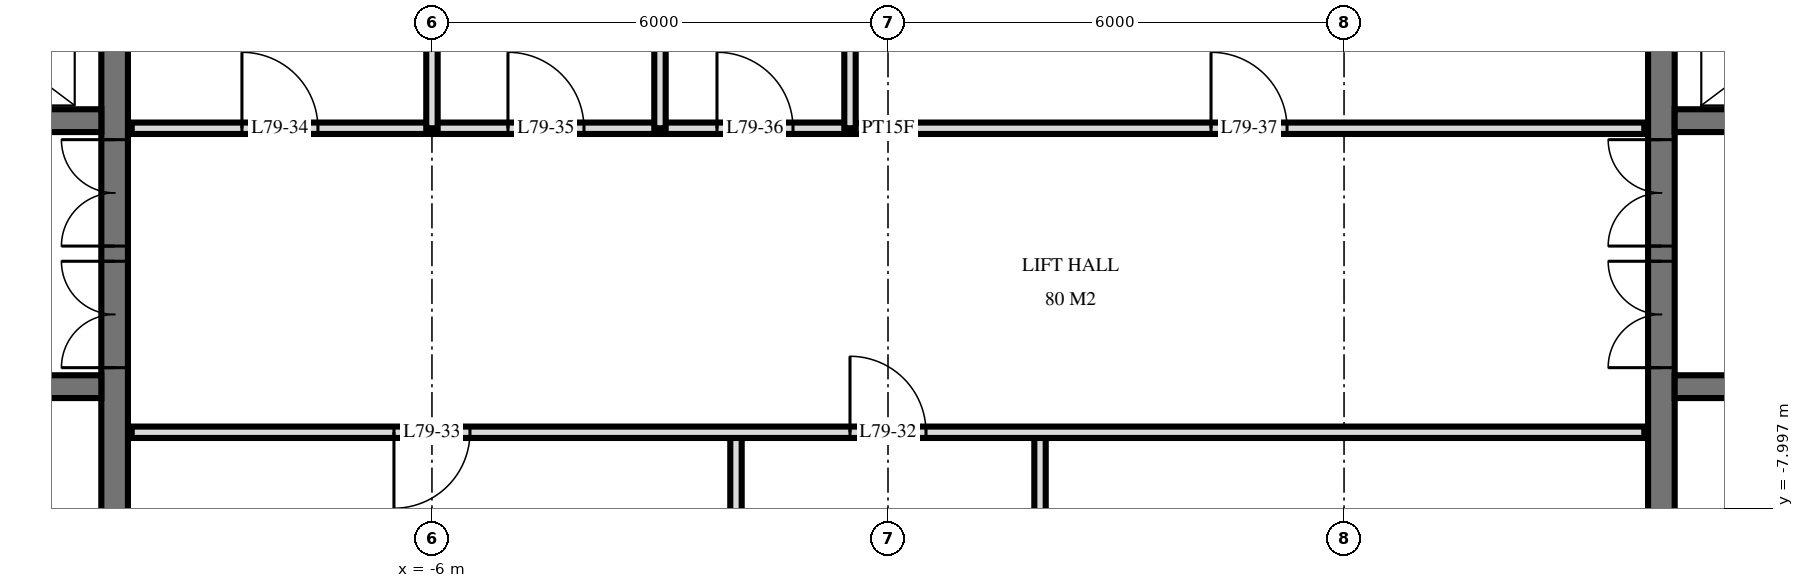
"""IFC4 building model, lengths in metres.
Left out: names, types, materials, properties, quantities, classifications, styles, units other than length and angle.
Written with IfcOpenShell. Run it as: python <this file> out.ifc"""

import sys

from ifc_helpers import new_model, si_unit, direction, frame, frame_2d, origin, place, context, subcontext, project, spatial, rectangle, extrude, element, fill, save


model = new_model("IFC4")
c1 = context("Model", 3, precision=1e-05, world=origin(), true_north=direction((0.0, 1.0)))
c2 = subcontext(c1, "Body", "Model", "MODEL_VIEW")
j1 = project(units=[si_unit("LENGTHUNIT", "METRE"), si_unit("PLANEANGLEUNIT", "RADIAN")], contexts=[c1])
p1 = place(None, origin())
s1 = spatial("IfcSite", under=j1, at=p1, CompositionType="ELEMENT")
p2 = place(p1, origin())
s2 = spatial("IfcBuilding", under=s1, at=p2, CompositionType="ELEMENT")
p3 = place(p2, frame((0.0, 0.0, 298.1)))
s3 = spatial("IfcBuildingStorey", under=s2, at=p3, CompositionType="ELEMENT", Elevation=298.1)
p4 = place(p3, frame((-10.175, -14.55, 0.0), z_axis=(0.0, 0.0, 1.0), x_axis=(0.0, 1.0, 0.0)))
e1 = element("IfcWall", 1, at=p4, inside=s3, PredefinedType="SHEAR", context=c2, shape_type="SweptSolid", body=[
    extrude(rectangle(XDim=14.1, YDim=0.35, at=frame_2d((7.05, 0.0))), origin(), (0.0, 0.0, 1.0), 3.5),
])
p5 = place(p4, frame((8.4, 0.0, 0.0)))
e2 = element("IfcOpeningElement", 2, at=p5, cuts=e1, PredefinedType="OPENING", context=c2, shape_type="SweptSolid", body=[
    extrude(rectangle(XDim=1.4, YDim=2.4, at=frame_2d((0.7, 1.2))), frame((0.0, 0.185, 0.0), z_axis=(0.0, -1.0, 0.0), x_axis=(1.0, 0.0, 0.0)), (0.0, 0.0, 1.0), 0.37),
])
p6 = place(p4, frame((10.0, 0.0, 0.0)))
e3 = element("IfcOpeningElement", 3, at=p6, cuts=e1, PredefinedType="OPENING", context=c2, shape_type="SweptSolid", body=[
    extrude(rectangle(XDim=1.4, YDim=2.4, at=frame_2d((0.7, 1.2))), frame((0.0, 0.185, 0.0), z_axis=(0.0, -1.0, 0.0), x_axis=(1.0, 0.0, 0.0)), (0.0, 0.0, 1.0), 0.37),
])
p7 = place(p4, frame((4.0, 0.0, 0.0)))
e4 = element("IfcOpeningElement", 4, at=p7, cuts=e1, PredefinedType="OPENING", context=c2, shape_type="SweptSolid", body=[
    extrude(rectangle(XDim=1.2, YDim=2.1, at=frame_2d((0.6, 1.05))), frame((0.0, 0.185, 0.0), z_axis=(0.0, -1.0, 0.0), x_axis=(1.0, 0.0, 0.0)), (0.0, 0.0, 1.0), 0.37),
])
p8 = place(p3, frame((-19.05, -2.9, 0.0), z_axis=(0.0, 0.0, 1.0), x_axis=(1.0, 0.0, 0.0)))
e5 = element("IfcWall", 5, at=p8, inside=s3, PredefinedType="SHEAR", context=c2, shape_type="SweptSolid", body=[
    extrude(rectangle(XDim=8.7, YDim=0.3, at=frame_2d((4.35, 0.0))), origin(), (0.0, 0.0, 1.0), 3.5),
])
p9 = place(p8, frame((6.8, 0.0, 0.0)))
e6 = element("IfcOpeningElement", 6, at=p9, cuts=e5, PredefinedType="OPENING", context=c2, shape_type="SweptSolid", body=[
    extrude(rectangle(XDim=1.1, YDim=2.1, at=frame_2d((0.55, 1.05))), frame((0.0, 0.16, 0.0), z_axis=(0.0, -1.0, 0.0), x_axis=(1.0, 0.0, 0.0)), (0.0, 0.0, 1.0), 0.32),
])
p10 = place(p8, frame((3.8, 0.0, 0.0)))
e7 = element("IfcOpeningElement", 7, at=p10, cuts=e5, PredefinedType="OPENING", context=c2, shape_type="SweptSolid", body=[
    extrude(rectangle(XDim=1.1, YDim=2.1, at=frame_2d((0.55, 1.05))), frame((0.0, 0.16, 0.0), z_axis=(0.0, -1.0, 0.0), x_axis=(1.0, 0.0, 0.0)), (0.0, 0.0, 1.0), 0.32),
])
p11 = place(p8, frame((1.863, 0.0, 0.0)))
e8 = element("IfcOpeningElement", 8, at=p11, cuts=e5, PredefinedType="OPENING", context=c2, shape_type="SweptSolid", body=[
    extrude(rectangle(XDim=0.9, YDim=2.1, at=frame_2d((0.45, 1.05))), frame((0.0, 0.16, 0.0), z_axis=(0.0, -1.0, 0.0), x_axis=(1.0, 0.0, 0.0)), (0.0, 0.0, 1.0), 0.32),
])
p12 = place(p8, frame((0.438, 0.0, 0.0)))
e9 = element("IfcOpeningElement", 9, at=p12, cuts=e5, PredefinedType="OPENING", context=c2, shape_type="SweptSolid", body=[
    extrude(rectangle(XDim=0.9, YDim=2.1, at=frame_2d((0.45, 1.05))), frame((0.0, 0.16, 0.0), z_axis=(0.0, -1.0, 0.0), x_axis=(1.0, 0.0, 0.0)), (0.0, 0.0, 1.0), 0.32),
])
p13 = place(p3, frame((-19.05, -6.4, 0.0), z_axis=(0.0, 0.0, 1.0), x_axis=(1.0, 0.0, 0.0)))
e10 = element("IfcWall", 10, at=p13, inside=s3, PredefinedType="SHEAR", context=c2, shape_type="SweptSolid", body=[
    extrude(rectangle(XDim=8.7, YDim=0.3, at=frame_2d((4.35, 0.0))), origin(), (0.0, 0.0, 1.0), 3.5),
])
p14 = place(p13, frame((0.8, 0.0, 0.0)))
e11 = element("IfcOpeningElement", 11, at=p14, cuts=e10, PredefinedType="OPENING", context=c2, shape_type="SweptSolid", body=[
    extrude(rectangle(XDim=1.1, YDim=2.1, at=frame_2d((0.55, 1.05))), frame((0.0, 0.16, 0.0), z_axis=(0.0, -1.0, 0.0), x_axis=(1.0, 0.0, 0.0)), (0.0, 0.0, 1.0), 0.32),
])
p15 = place(p3, frame((10.175, -14.55, 0.0), z_axis=(0.0, 0.0, 1.0), x_axis=(0.0, 1.0, 0.0)))
e12 = element("IfcWall", 12, at=p15, inside=s3, PredefinedType="SHEAR", context=c2, shape_type="SweptSolid", body=[
    extrude(rectangle(XDim=14.1, YDim=0.35, at=frame_2d((7.05, 0.0))), origin(), (0.0, 0.0, 1.0), 3.5),
])
p16 = place(p15, frame((8.4, 0.0, 0.0)))
e13 = element("IfcOpeningElement", 13, at=p16, cuts=e12, PredefinedType="OPENING", context=c2, shape_type="SweptSolid", body=[
    extrude(rectangle(XDim=1.4, YDim=2.4, at=frame_2d((0.7, 1.2))), frame((0.0, 0.185, 0.0), z_axis=(0.0, -1.0, 0.0), x_axis=(1.0, 0.0, 0.0)), (0.0, 0.0, 1.0), 0.37),
])
p17 = place(p15, frame((10.0, 0.0, 0.0)))
e14 = element("IfcOpeningElement", 14, at=p17, cuts=e12, PredefinedType="OPENING", context=c2, shape_type="SweptSolid", body=[
    extrude(rectangle(XDim=1.4, YDim=2.4, at=frame_2d((0.7, 1.2))), frame((0.0, 0.185, 0.0), z_axis=(0.0, -1.0, 0.0), x_axis=(1.0, 0.0, 0.0)), (0.0, 0.0, 1.0), 0.37),
])
p18 = place(p15, frame((4.0, 0.0, 0.0)))
e15 = element("IfcOpeningElement", 15, at=p18, cuts=e12, PredefinedType="OPENING", context=c2, shape_type="SweptSolid", body=[
    extrude(rectangle(XDim=1.2, YDim=2.1, at=frame_2d((0.6, 1.05))), frame((0.0, 0.185, 0.0), z_axis=(0.0, -1.0, 0.0), x_axis=(1.0, 0.0, 0.0)), (0.0, 0.0, 1.0), 0.37),
])
p19 = place(p3, frame((10.35, -2.9, 0.0), z_axis=(0.0, 0.0, 1.0), x_axis=(1.0, 0.0, 0.0)))
e16 = element("IfcWall", 16, at=p19, inside=s3, PredefinedType="SHEAR", context=c2, shape_type="SweptSolid", body=[
    extrude(rectangle(XDim=8.7, YDim=0.3, at=frame_2d((4.35, 0.0))), origin(), (0.0, 0.0, 1.0), 3.5),
])
p20 = place(p19, frame((0.8, 0.0, 0.0)))
e17 = element("IfcOpeningElement", 17, at=p20, cuts=e16, PredefinedType="OPENING", context=c2, shape_type="SweptSolid", body=[
    extrude(rectangle(XDim=1.1, YDim=2.1, at=frame_2d((0.55, 1.05))), frame((0.0, 0.16, 0.0), z_axis=(0.0, -1.0, 0.0), x_axis=(1.0, 0.0, 0.0)), (0.0, 0.0, 1.0), 0.32),
])
p21 = place(p19, frame((3.8, 0.0, 0.0)))
e18 = element("IfcOpeningElement", 18, at=p21, cuts=e16, PredefinedType="OPENING", context=c2, shape_type="SweptSolid", body=[
    extrude(rectangle(XDim=1.1, YDim=2.1, at=frame_2d((0.55, 1.05))), frame((0.0, 0.16, 0.0), z_axis=(0.0, -1.0, 0.0), x_axis=(1.0, 0.0, 0.0)), (0.0, 0.0, 1.0), 0.32),
])
p22 = place(p19, frame((5.938, 0.0, 0.0)))
e19 = element("IfcOpeningElement", 19, at=p22, cuts=e16, PredefinedType="OPENING", context=c2, shape_type="SweptSolid", body=[
    extrude(rectangle(XDim=0.9, YDim=2.1, at=frame_2d((0.45, 1.05))), frame((0.0, 0.16, 0.0), z_axis=(0.0, -1.0, 0.0), x_axis=(1.0, 0.0, 0.0)), (0.0, 0.0, 1.0), 0.32),
])
p23 = place(p19, frame((7.363, 0.0, 0.0)))
e20 = element("IfcOpeningElement", 20, at=p23, cuts=e16, PredefinedType="OPENING", context=c2, shape_type="SweptSolid", body=[
    extrude(rectangle(XDim=0.9, YDim=2.1, at=frame_2d((0.45, 1.05))), frame((0.0, 0.16, 0.0), z_axis=(0.0, -1.0, 0.0), x_axis=(1.0, 0.0, 0.0)), (0.0, 0.0, 1.0), 0.32),
])
p24 = place(p3, frame((10.35, -6.4, 0.0), z_axis=(0.0, 0.0, 1.0), x_axis=(1.0, 0.0, 0.0)))
e21 = element("IfcWall", 21, at=p24, inside=s3, PredefinedType="SHEAR", context=c2, shape_type="SweptSolid", body=[
    extrude(rectangle(XDim=8.7, YDim=0.3, at=frame_2d((4.35, 0.0))), origin(), (0.0, 0.0, 1.0), 3.5),
])
p25 = place(p24, frame((6.8, 0.0, 0.0)))
e22 = element("IfcOpeningElement", 22, at=p25, cuts=e21, PredefinedType="OPENING", context=c2, shape_type="SweptSolid", body=[
    extrude(rectangle(XDim=1.1, YDim=2.1, at=frame_2d((0.55, 1.05))), frame((0.0, 0.16, 0.0), z_axis=(0.0, -1.0, 0.0), x_axis=(1.0, 0.0, 0.0)), (0.0, 0.0, 1.0), 0.32),
])
p26 = place(p3, frame((2.0, -11.0, 0.0), z_axis=(0.0, 0.0, 1.0), x_axis=(0.0, 1.0, 0.0)))
e23 = element("IfcWall", 23, at=p26, inside=s3, PredefinedType="PARTITIONING", context=c2, shape_type="SweptSolid", body=[
    extrude(rectangle(XDim=4.0, YDim=0.15, at=frame_2d((2.0, 0.0))), origin(), (0.0, 0.0, 1.0), 3.22),
])
p27 = place(p3, frame((-0.5, -3.0, 0.0), z_axis=(0.0, 0.0, 1.0), x_axis=(0.0, 1.0, 0.0)))
e24 = element("IfcWall", 24, at=p27, inside=s3, PredefinedType="PLUMBINGWALL", context=c2, shape_type="SweptSolid", body=[
    extrude(rectangle(XDim=4.02, YDim=0.15, at=frame_2d((2.01, 0.0))), origin(), (0.0, 0.0, 1.0), 3.22),
])
p28 = place(p3, frame((-2.0, -11.0, 0.0), z_axis=(0.0, 0.0, 1.0), x_axis=(0.0, 1.0, 0.0)))
e25 = element("IfcWall", 25, at=p28, inside=s3, PredefinedType="PARTITIONING", context=c2, shape_type="SweptSolid", body=[
    extrude(rectangle(XDim=4.0, YDim=0.15, at=frame_2d((2.0, 0.0))), origin(), (0.0, 0.0, 1.0), 3.22),
])
for number, where, z_axis, x_axis in (
    (26, (-3.0, -3.0, 0.0), (0.0, 0.0, 1.0), (0.0, 1.0, 0.0)),
    (27, (-6.0, -3.0, 0.0), (0.0, 0.0, 1.0), (0.0, 1.0, 0.0)),
):
    element("IfcWall", number, at=place(p3, frame(where, z_axis=z_axis, x_axis=x_axis)), inside=s3, PredefinedType="PLUMBINGWALL", context=c2, shape_type="SweptSolid", body=[
        extrude(rectangle(XDim=4.02, YDim=0.15, at=frame_2d((2.01, 0.0))), origin(), (0.0, 0.0, 1.0), 3.22),
    ])
p29 = place(p3, frame((-9.95, -7.0, 0.0), z_axis=(0.0, 0.0, 1.0), x_axis=(1.0, 0.0, 0.0)))
e28 = element("IfcWall", 28, at=p29, inside=s3, PredefinedType="PARTITIONING", context=c2, shape_type="SweptSolid", body=[
    extrude(rectangle(XDim=19.9, YDim=0.15, at=frame_2d((9.95, 0.0))), origin(), (0.0, 0.0, 1.0), 3.22),
])
p30 = place(p29, frame((9.45, 0.0, 0.0)))
e29 = element("IfcOpeningElement", 29, at=p30, cuts=e28, PredefinedType="OPENING", context=c2, shape_type="SweptSolid", body=[
    extrude(rectangle(XDim=1.0, YDim=2.1, at=frame_2d((0.5, 1.05))), frame((0.0, 0.085, 0.0), z_axis=(0.0, -1.0, 0.0), x_axis=(1.0, 0.0, 0.0)), (0.0, 0.0, 1.0), 0.17),
])
p31 = place(p29, frame((3.45, 0.0, 0.0)))
e30 = element("IfcOpeningElement", 30, at=p31, cuts=e28, PredefinedType="OPENING", context=c2, shape_type="SweptSolid", body=[
    extrude(rectangle(XDim=1.0, YDim=2.1, at=frame_2d((0.5, 1.05))), frame((0.0, 0.085, 0.0), z_axis=(0.0, -1.0, 0.0), x_axis=(1.0, 0.0, 0.0)), (0.0, 0.0, 1.0), 0.17),
])
p32 = place(p3, frame((-9.95, -3.0, 0.0), z_axis=(0.0, 0.0, 1.0), x_axis=(1.0, 0.0, 0.0)))
e31 = element("IfcWall", 31, at=p32, inside=s3, PredefinedType="PARTITIONING", context=c2, shape_type="SweptSolid", body=[
    extrude(rectangle(XDim=19.9, YDim=0.15, at=frame_2d((9.95, 0.0))), origin(), (0.0, 0.0, 1.0), 3.22),
])
p33 = place(p32, frame((1.45, 0.0, 0.0)))
e32 = element("IfcOpeningElement", 32, at=p33, cuts=e31, PredefinedType="OPENING", context=c2, shape_type="SweptSolid", body=[
    extrude(rectangle(XDim=1.0, YDim=2.1, at=frame_2d((0.5, 1.05))), frame((0.0, 0.085, 0.0), z_axis=(0.0, -1.0, 0.0), x_axis=(1.0, 0.0, 0.0)), (0.0, 0.0, 1.0), 0.17),
])
p34 = place(p32, frame((4.95, 0.0, 0.0)))
e33 = element("IfcOpeningElement", 33, at=p34, cuts=e31, PredefinedType="OPENING", context=c2, shape_type="SweptSolid", body=[
    extrude(rectangle(XDim=1.0, YDim=2.1, at=frame_2d((0.5, 1.05))), frame((0.0, 0.085, 0.0), z_axis=(0.0, -1.0, 0.0), x_axis=(1.0, 0.0, 0.0)), (0.0, 0.0, 1.0), 0.17),
])
p35 = place(p32, frame((7.7, 0.0, 0.0)))
e34 = element("IfcOpeningElement", 34, at=p35, cuts=e31, PredefinedType="OPENING", context=c2, shape_type="SweptSolid", body=[
    extrude(rectangle(XDim=1.0, YDim=2.1, at=frame_2d((0.5, 1.05))), frame((0.0, 0.085, 0.0), z_axis=(0.0, -1.0, 0.0), x_axis=(1.0, 0.0, 0.0)), (0.0, 0.0, 1.0), 0.17),
])
p36 = place(p32, frame((14.2, 0.0, 0.0)))
e35 = element("IfcOpeningElement", 35, at=p36, cuts=e31, PredefinedType="OPENING", context=c2, shape_type="SweptSolid", body=[
    extrude(rectangle(XDim=1.0, YDim=2.1, at=frame_2d((0.5, 1.05))), frame((0.0, 0.085, 0.0), z_axis=(0.0, -1.0, 0.0), x_axis=(1.0, 0.0, 0.0)), (0.0, 0.0, 1.0), 0.17),
])
p37 = place(p5, origin())
e36 = element("IfcDoor", 36, at=p37, inside=s3, OperationType="DOUBLE_DOOR_SINGLE_SWING", PredefinedType="DOOR", context=c2, shape_type="SweptSolid", body=[
    extrude(rectangle(XDim=1.4, YDim=2.4, at=frame_2d((0.7, 1.2))), frame((0.0, 0.025, 0.0), z_axis=(0.0, -1.0, 0.0), x_axis=(1.0, 0.0, 0.0)), (0.0, 0.0, 1.0), 0.05),
])
fill(e2, e36)
p38 = place(p6, origin())
e37 = element("IfcDoor", 37, at=p38, inside=s3, OperationType="DOUBLE_DOOR_SINGLE_SWING", PredefinedType="DOOR", context=c2, shape_type="SweptSolid", body=[
    extrude(rectangle(XDim=1.4, YDim=2.4, at=frame_2d((0.7, 1.2))), frame((0.0, 0.025, 0.0), z_axis=(0.0, -1.0, 0.0), x_axis=(1.0, 0.0, 0.0)), (0.0, 0.0, 1.0), 0.05),
])
fill(e3, e37)
p39 = place(p16, origin())
e38 = element("IfcDoor", 38, at=p39, inside=s3, OperationType="DOUBLE_DOOR_SINGLE_SWING", PredefinedType="DOOR", context=c2, shape_type="SweptSolid", body=[
    extrude(rectangle(XDim=1.4, YDim=2.4, at=frame_2d((0.7, 1.2))), frame((0.0, 0.025, 0.0), z_axis=(0.0, -1.0, 0.0), x_axis=(1.0, 0.0, 0.0)), (0.0, 0.0, 1.0), 0.05),
])
fill(e13, e38)
p40 = place(p17, origin())
e39 = element("IfcDoor", 39, at=p40, inside=s3, OperationType="DOUBLE_DOOR_SINGLE_SWING", PredefinedType="DOOR", context=c2, shape_type="SweptSolid", body=[
    extrude(rectangle(XDim=1.4, YDim=2.4, at=frame_2d((0.7, 1.2))), frame((0.0, 0.025, 0.0), z_axis=(0.0, -1.0, 0.0), x_axis=(1.0, 0.0, 0.0)), (0.0, 0.0, 1.0), 0.05),
])
fill(e14, e39)
p41 = place(p30, origin())
e40 = element("IfcDoor", 40, at=p41, inside=s3, OperationType="SINGLE_SWING_RIGHT", PredefinedType="DOOR", context=c2, shape_type="SweptSolid", body=[
    extrude(rectangle(XDim=1.0, YDim=2.1, at=frame_2d((0.5, 1.05))), frame((0.0, 0.025, 0.0), z_axis=(0.0, -1.0, 0.0), x_axis=(1.0, 0.0, 0.0)), (0.0, 0.0, 1.0), 0.05),
])
fill(e29, e40)
p42 = place(p31, frame((0.5, 0.0, 0.0), z_axis=(0.0, 0.0, 1.0), x_axis=(-1.0, 0.0, 0.0)))
e41 = element("IfcDoor", 41, at=p42, inside=s3, OperationType="SINGLE_SWING_LEFT", PredefinedType="DOOR", context=c2, shape_type="SweptSolid", body=[
    extrude(rectangle(XDim=1.0, YDim=2.1, at=frame_2d((0.0, 1.05))), frame((0.0, -0.025, 0.0), z_axis=(0.0, 1.0, 0.0), x_axis=(-1.0, 0.0, 0.0)), (0.0, 0.0, 1.0), 0.05),
])
fill(e30, e41)
p43 = place(p33, origin())
e42 = element("IfcDoor", 42, at=p43, inside=s3, OperationType="SINGLE_SWING_RIGHT", PredefinedType="DOOR", context=c2, shape_type="SweptSolid", body=[
    extrude(rectangle(XDim=1.0, YDim=2.1, at=frame_2d((0.5, 1.05))), frame((0.0, 0.025, 0.0), z_axis=(0.0, -1.0, 0.0), x_axis=(1.0, 0.0, 0.0)), (0.0, 0.0, 1.0), 0.05),
])
fill(e32, e42)
p44 = place(p34, origin())
e43 = element("IfcDoor", 43, at=p44, inside=s3, OperationType="SINGLE_SWING_RIGHT", PredefinedType="DOOR", context=c2, shape_type="SweptSolid", body=[
    extrude(rectangle(XDim=1.0, YDim=2.1, at=frame_2d((0.5, 1.05))), frame((0.0, 0.025, 0.0), z_axis=(0.0, -1.0, 0.0), x_axis=(1.0, 0.0, 0.0)), (0.0, 0.0, 1.0), 0.05),
])
fill(e33, e43)
p45 = place(p35, origin())
e44 = element("IfcDoor", 44, at=p45, inside=s3, OperationType="SINGLE_SWING_RIGHT", PredefinedType="DOOR", context=c2, shape_type="SweptSolid", body=[
    extrude(rectangle(XDim=1.0, YDim=2.1, at=frame_2d((0.5, 1.05))), frame((0.0, 0.025, 0.0), z_axis=(0.0, -1.0, 0.0), x_axis=(1.0, 0.0, 0.0)), (0.0, 0.0, 1.0), 0.05),
])
fill(e34, e44)
p46 = place(p36, origin())
e45 = element("IfcDoor", 45, at=p46, inside=s3, OperationType="SINGLE_SWING_RIGHT", PredefinedType="DOOR", context=c2, shape_type="SweptSolid", body=[
    extrude(rectangle(XDim=1.0, YDim=2.1, at=frame_2d((0.5, 1.05))), frame((0.0, 0.025, 0.0), z_axis=(0.0, -1.0, 0.0), x_axis=(1.0, 0.0, 0.0)), (0.0, 0.0, 1.0), 0.05),
])
fill(e35, e45)
save(model, sys.argv[1])
